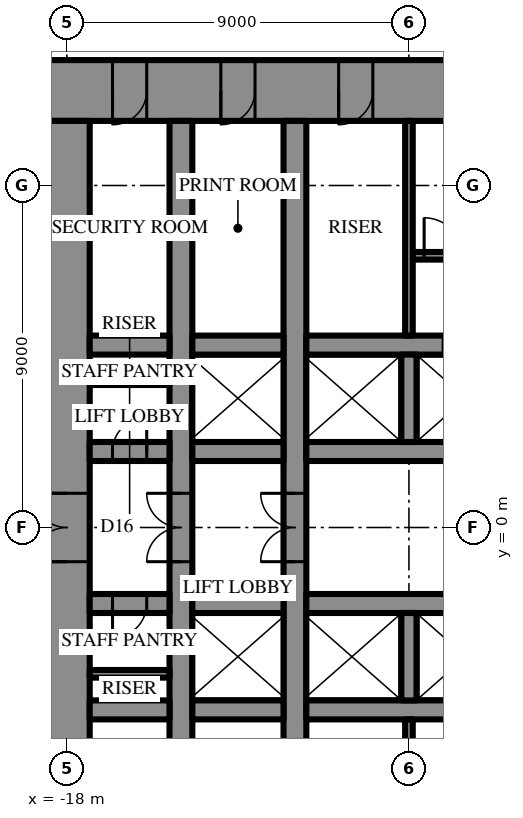
"""IFC4 building model, lengths in metres.
Left out: names, types, materials, properties, quantities, classifications, styles, units other than length and angle.
Written with IfcOpenShell. Run it as: python <this file> out.ifc"""

import sys

from ifc_helpers import new_model, si_unit, direction, frame, frame_2d, origin, place, context, subcontext, project, spatial, rectangle, extrude, element, fill, save


model = new_model("IFC4")
c1 = context("Model", 3, precision=1e-05, world=origin(), true_north=direction((0.0, 1.0)))
c2 = subcontext(c1, "Body", "Model", "MODEL_VIEW")
j1 = project(units=[si_unit("LENGTHUNIT", "METRE"), si_unit("PLANEANGLEUNIT", "RADIAN")], contexts=[c1])
p1 = place(None, origin())
s1 = spatial("IfcSite", under=j1, at=p1, CompositionType="ELEMENT")
p2 = place(p1, origin())
s2 = spatial("IfcBuilding", under=s1, at=p2, CompositionType="ELEMENT")
p3 = place(p2, frame((0.0, 0.0, 140.5)))
s3 = spatial("IfcBuildingStorey", under=s2, at=p3, CompositionType="ELEMENT", Elevation=140.5)
p4 = place(p3, frame((-18.6, 11.5, 0.0), z_axis=(0.0, 0.0, 1.0), x_axis=(1.0, 0.0, 0.0)))
e1 = element("IfcWall", 1, at=p4, inside=s3, PredefinedType="SHEAR", context=c2, shape_type="SweptSolid", body=[
    extrude(rectangle(XDim=37.2, YDim=1.6, at=frame_2d((18.6, 0.0))), origin(), (0.0, 0.0, 1.0), 4.2),
])
p5 = place(p4, frame((19.45, 0.0, 0.0)))
e2 = element("IfcOpeningElement", 2, at=p5, cuts=e1, PredefinedType="OPENING", context=c2, shape_type="SweptSolid", body=[
    extrude(rectangle(XDim=0.9, YDim=2.2, at=frame_2d((0.45, 1.1))), frame((0.0, 0.81, 0.0), z_axis=(0.0, -1.0, 0.0), x_axis=(1.0, 0.0, 0.0)), (0.0, 0.0, 1.0), 1.62),
])
p6 = place(p4, frame((22.45, 0.0, 0.0)))
e3 = element("IfcOpeningElement", 3, at=p6, cuts=e1, PredefinedType="OPENING", context=c2, shape_type="SweptSolid", body=[
    extrude(rectangle(XDim=0.9, YDim=2.2, at=frame_2d((0.45, 1.1))), frame((0.0, 0.81, 0.0), z_axis=(0.0, -1.0, 0.0), x_axis=(1.0, 0.0, 0.0)), (0.0, 0.0, 1.0), 1.62),
])
p7 = place(p4, frame((25.5, 0.0, 0.0)))
e4 = element("IfcOpeningElement", 4, at=p7, cuts=e1, PredefinedType="OPENING", context=c2, shape_type="SweptSolid", body=[
    extrude(rectangle(XDim=1.0, YDim=2.2, at=frame_2d((0.5, 1.1))), frame((0.0, 0.81, 0.0), z_axis=(0.0, -1.0, 0.0), x_axis=(1.0, 0.0, 0.0)), (0.0, 0.0, 1.0), 1.62),
])
p8 = place(p4, frame((1.8, 0.0, 0.0)))
e5 = element("IfcOpeningElement", 5, at=p8, cuts=e1, PredefinedType="OPENING", context=c2, shape_type="SweptSolid", body=[
    extrude(rectangle(XDim=0.9, YDim=2.2, at=frame_2d((0.45, 1.1))), frame((0.0, 0.81, 0.0), z_axis=(0.0, -1.0, 0.0), x_axis=(1.0, 0.0, 0.0)), (0.0, 0.0, 1.0), 1.62),
])
p9 = place(p4, frame((4.65, 0.0, 0.0)))
e6 = element("IfcOpeningElement", 6, at=p9, cuts=e1, PredefinedType="OPENING", context=c2, shape_type="SweptSolid", body=[
    extrude(rectangle(XDim=0.9, YDim=2.2, at=frame_2d((0.45, 1.1))), frame((0.0, 0.81, 0.0), z_axis=(0.0, -1.0, 0.0), x_axis=(1.0, 0.0, 0.0)), (0.0, 0.0, 1.0), 1.62),
])
p10 = place(p4, frame((7.75, 0.0, 0.0)))
e7 = element("IfcOpeningElement", 7, at=p10, cuts=e1, PredefinedType="OPENING", context=c2, shape_type="SweptSolid", body=[
    extrude(rectangle(XDim=0.9, YDim=2.2, at=frame_2d((0.45, 1.1))), frame((0.0, 0.81, 0.0), z_axis=(0.0, -1.0, 0.0), x_axis=(1.0, 0.0, 0.0)), (0.0, 0.0, 1.0), 1.62),
])
p11 = place(p4, frame((28.55, 0.0, 0.0)))
e8 = element("IfcOpeningElement", 8, at=p11, cuts=e1, PredefinedType="OPENING", context=c2, shape_type="SweptSolid", body=[
    extrude(rectangle(XDim=0.9, YDim=2.2, at=frame_2d((0.45, 1.1))), frame((0.0, 0.81, 0.0), z_axis=(0.0, -1.0, 0.0), x_axis=(1.0, 0.0, 0.0)), (0.0, 0.0, 1.0), 1.62),
])
p12 = place(p4, frame((31.65, 0.0, 0.0)))
e9 = element("IfcOpeningElement", 9, at=p12, cuts=e1, PredefinedType="OPENING", context=c2, shape_type="SweptSolid", body=[
    extrude(rectangle(XDim=0.9, YDim=2.2, at=frame_2d((0.45, 1.1))), frame((0.0, 0.81, 0.0), z_axis=(0.0, -1.0, 0.0), x_axis=(1.0, 0.0, 0.0)), (0.0, 0.0, 1.0), 1.62),
])
p13 = place(p4, frame((34.5, 0.0, 0.0)))
e10 = element("IfcOpeningElement", 10, at=p13, cuts=e1, PredefinedType="OPENING", context=c2, shape_type="SweptSolid", body=[
    extrude(rectangle(XDim=0.9, YDim=2.2, at=frame_2d((0.45, 1.1))), frame((0.0, 0.81, 0.0), z_axis=(0.0, -1.0, 0.0), x_axis=(1.0, 0.0, 0.0)), (0.0, 0.0, 1.0), 1.62),
])
p14 = place(p3, frame((-18.0, 10.7, 0.0), z_axis=(0.0, 0.0, 1.0), x_axis=(0.0, -1.0, 0.0)))
e11 = element("IfcWall", 11, at=p14, inside=s3, PredefinedType="SHEAR", context=c2, shape_type="SweptSolid", body=[
    extrude(rectangle(XDim=21.4, YDim=1.2, at=frame_2d((10.7, 0.0))), origin(), (0.0, 0.0, 1.0), 4.2),
])
p15 = place(p14, frame((9.8, 0.0, 0.0)))
e12 = element("IfcOpeningElement", 12, at=p15, cuts=e11, PredefinedType="OPENING", context=c2, shape_type="SweptSolid", body=[
    extrude(rectangle(XDim=1.8, YDim=2.4, at=frame_2d((0.9, 1.2))), frame((0.0, 0.61, 0.0), z_axis=(0.0, -1.0, 0.0), x_axis=(1.0, 0.0, 0.0)), (0.0, 0.0, 1.0), 1.22),
])
p16 = place(p3, frame((-12.0, -10.7, 0.0), z_axis=(0.0, 0.0, 1.0), x_axis=(0.0, 1.0, 0.0)))
e13 = element("IfcWall", 13, at=p16, inside=s3, PredefinedType="SHEAR", context=c2, shape_type="SweptSolid", body=[
    extrude(rectangle(XDim=21.4, YDim=0.6, at=frame_2d((10.7, 0.0))), origin(), (0.0, 0.0, 1.0), 4.2),
])
p17 = place(p16, frame((9.8, 0.0, 0.0)))
e14 = element("IfcOpeningElement", 14, at=p17, cuts=e13, PredefinedType="OPENING", context=c2, shape_type="SweptSolid", body=[
    extrude(rectangle(XDim=1.8, YDim=2.4, at=frame_2d((0.9, 1.2))), frame((0.0, 0.31, 0.0), z_axis=(0.0, -1.0, 0.0), x_axis=(1.0, 0.0, 0.0)), (0.0, 0.0, 1.0), 0.62),
])
p18 = place(p3, frame((-15.0, -10.7, 0.0), z_axis=(0.0, 0.0, 1.0), x_axis=(0.0, 1.0, 0.0)))
e15 = element("IfcWall", 15, at=p18, inside=s3, PredefinedType="SHEAR", context=c2, shape_type="SweptSolid", body=[
    extrude(rectangle(XDim=21.4, YDim=0.6, at=frame_2d((10.7, 0.0))), origin(), (0.0, 0.0, 1.0), 4.2),
])
p19 = place(p18, frame((9.8, 0.0, 0.0)))
e16 = element("IfcOpeningElement", 16, at=p19, cuts=e15, PredefinedType="OPENING", context=c2, shape_type="SweptSolid", body=[
    extrude(rectangle(XDim=1.8, YDim=2.4, at=frame_2d((0.9, 1.2))), frame((0.0, 0.31, 0.0), z_axis=(0.0, -1.0, 0.0), x_axis=(1.0, 0.0, 0.0)), (0.0, 0.0, 1.0), 0.62),
])
p20 = place(p3, frame((-17.4, 2.0, 0.0), z_axis=(0.0, 0.0, 1.0), x_axis=(1.0, 0.0, 0.0)))
e17 = element("IfcWall", 17, at=p20, inside=s3, PredefinedType="SHEAR", context=c2, shape_type="SweptSolid", body=[
    extrude(rectangle(XDim=2.1, YDim=0.5, at=frame_2d((1.05, 0.0))), origin(), (0.0, 0.0, 1.0), 4.2),
])
p21 = place(p20, frame((0.6, 0.0, 0.0)))
e18 = element("IfcOpeningElement", 18, at=p21, cuts=e17, PredefinedType="OPENING", context=c2, shape_type="SweptSolid", body=[
    extrude(rectangle(XDim=0.9, YDim=2.2, at=frame_2d((0.45, 1.1))), frame((0.0, 0.26, 0.0), z_axis=(0.0, -1.0, 0.0), x_axis=(1.0, 0.0, 0.0)), (0.0, 0.0, 1.0), 0.52),
])
p22 = place(p3, frame((-14.7, 2.0, 0.0), z_axis=(0.0, 0.0, 1.0), x_axis=(1.0, 0.0, 0.0)))
e19 = element("IfcWall", 19, at=p22, inside=s3, PredefinedType="SHEAR", context=c2, shape_type="SweptSolid", body=[
    extrude(rectangle(XDim=2.4, YDim=0.5, at=frame_2d((1.2, 0.0))), origin(), (0.0, 0.0, 1.0), 4.2),
])
p23 = place(p3, frame((-11.7, 2.0, 0.0), z_axis=(0.0, 0.0, 1.0), x_axis=(1.0, 0.0, 0.0)))
e20 = element("IfcWall", 20, at=p23, inside=s3, PredefinedType="SHEAR", context=c2, shape_type="SweptSolid", body=[
    extrude(rectangle(XDim=5.9, YDim=0.5, at=frame_2d((2.95, 0.0))), origin(), (0.0, 0.0, 1.0), 4.2),
])
p24 = place(p3, frame((-17.4, 4.8, 0.0), z_axis=(0.0, 0.0, 1.0), x_axis=(1.0, 0.0, 0.0)))
e21 = element("IfcWall", 21, at=p24, inside=s3, PredefinedType="SHEAR", context=c2, shape_type="SweptSolid", body=[
    extrude(rectangle(XDim=2.1, YDim=0.5, at=frame_2d((1.05, 0.0))), origin(), (0.0, 0.0, 1.0), 4.2),
])
p25 = place(p3, frame((-14.7, 4.8, 0.0), z_axis=(0.0, 0.0, 1.0), x_axis=(1.0, 0.0, 0.0)))
e22 = element("IfcWall", 22, at=p25, inside=s3, PredefinedType="SHEAR", context=c2, shape_type="SweptSolid", body=[
    extrude(rectangle(XDim=2.4, YDim=0.5, at=frame_2d((1.2, 0.0))), origin(), (0.0, 0.0, 1.0), 4.2),
])
p26 = place(p3, frame((-11.7, 4.8, 0.0), z_axis=(0.0, 0.0, 1.0), x_axis=(1.0, 0.0, 0.0)))
e23 = element("IfcWall", 23, at=p26, inside=s3, PredefinedType="SHEAR", context=c2, shape_type="SweptSolid", body=[
    extrude(rectangle(XDim=23.4, YDim=0.5, at=frame_2d((11.7, 0.0))), origin(), (0.0, 0.0, 1.0), 4.2),
])
p27 = place(p26, frame((6.6, 0.0, 0.0)))
e24 = element("IfcOpeningElement", 24, at=p27, cuts=e23, PredefinedType="OPENING", context=c2, shape_type="SweptSolid", body=[
    extrude(rectangle(XDim=1.2, YDim=2.2, at=frame_2d((0.6, 1.1))), frame((0.0, 0.26, 0.0), z_axis=(0.0, -1.0, 0.0), x_axis=(1.0, 0.0, 0.0)), (0.0, 0.0, 1.0), 0.52),
])
p28 = place(p26, frame((3.6, 0.0, 0.0)))
e25 = element("IfcOpeningElement", 25, at=p28, cuts=e23, PredefinedType="OPENING", context=c2, shape_type="SweptSolid", body=[
    extrude(rectangle(XDim=1.2, YDim=2.2, at=frame_2d((0.6, 1.1))), frame((0.0, 0.26, 0.0), z_axis=(0.0, -1.0, 0.0), x_axis=(1.0, 0.0, 0.0)), (0.0, 0.0, 1.0), 0.52),
])
p29 = place(p3, frame((-9.0, 2.25, 0.0), z_axis=(0.0, 0.0, 1.0), x_axis=(0.0, 1.0, 0.0)))
e26 = element("IfcWall", 26, at=p29, inside=s3, PredefinedType="SHEAR", context=c2, shape_type="SweptSolid", body=[
    extrude(rectangle(XDim=2.3, YDim=0.4, at=frame_2d((1.15, 0.0))), origin(), (0.0, 0.0, 1.0), 4.2),
])
p30 = place(p3, frame((-8.9, 7.15, 0.0), z_axis=(0.0, 0.0, 1.0), x_axis=(1.0, 0.0, 0.0)))
e27 = element("IfcWall", 27, at=p30, inside=s3, PredefinedType="SHEAR", context=c2, shape_type="SweptSolid", body=[
    extrude(rectangle(XDim=8.6, YDim=0.2, at=frame_2d((4.3, 0.0))), origin(), (0.0, 0.0, 1.0), 4.2),
])
p31 = place(p30, frame((0.3, 0.0, 0.0)))
e28 = element("IfcOpeningElement", 28, at=p31, cuts=e27, PredefinedType="OPENING", context=c2, shape_type="SweptSolid", body=[
    extrude(rectangle(XDim=1.0, YDim=2.2, at=frame_2d((0.5, 1.1))), frame((0.0, 0.11, 0.0), z_axis=(0.0, -1.0, 0.0), x_axis=(1.0, 0.0, 0.0)), (0.0, 0.0, 1.0), 0.22),
])
p32 = place(p3, frame((3.2, -2.0, 0.0), z_axis=(0.0, 0.0, 1.0), x_axis=(-1.0, 0.0, 0.0)))
e29 = element("IfcWall", 29, at=p32, inside=s3, PredefinedType="SHEAR", context=c2, shape_type="SweptSolid", body=[
    extrude(rectangle(XDim=14.9, YDim=0.5, at=frame_2d((7.45, 0.0))), origin(), (0.0, 0.0, 1.0), 4.2),
])
p33 = place(p32, frame((1.15, 0.0, 0.0)))
e30 = element("IfcOpeningElement", 30, at=p33, cuts=e29, PredefinedType="OPENING", context=c2, shape_type="SweptSolid", body=[
    extrude(rectangle(XDim=1.1, YDim=2.2, at=frame_2d((0.55, 1.1))), frame((0.0, 0.26, 0.0), z_axis=(0.0, -1.0, 0.0), x_axis=(1.0, 0.0, 0.0)), (0.0, 0.0, 1.0), 0.52),
])
p34 = place(p32, frame((4.15, 0.0, 0.0)))
e31 = element("IfcOpeningElement", 31, at=p34, cuts=e29, PredefinedType="OPENING", context=c2, shape_type="SweptSolid", body=[
    extrude(rectangle(XDim=1.1, YDim=2.2, at=frame_2d((0.55, 1.1))), frame((0.0, 0.26, 0.0), z_axis=(0.0, -1.0, 0.0), x_axis=(1.0, 0.0, 0.0)), (0.0, 0.0, 1.0), 0.52),
])
p35 = place(p32, frame((7.15, 0.0, 0.0)))
e32 = element("IfcOpeningElement", 32, at=p35, cuts=e29, PredefinedType="OPENING", context=c2, shape_type="SweptSolid", body=[
    extrude(rectangle(XDim=1.1, YDim=2.2, at=frame_2d((0.55, 1.1))), frame((0.0, 0.26, 0.0), z_axis=(0.0, -1.0, 0.0), x_axis=(1.0, 0.0, 0.0)), (0.0, 0.0, 1.0), 0.52),
])
p36 = place(p32, frame((10.15, 0.0, 0.0)))
e33 = element("IfcOpeningElement", 33, at=p36, cuts=e29, PredefinedType="OPENING", context=c2, shape_type="SweptSolid", body=[
    extrude(rectangle(XDim=1.1, YDim=2.2, at=frame_2d((0.55, 1.1))), frame((0.0, 0.26, 0.0), z_axis=(0.0, -1.0, 0.0), x_axis=(1.0, 0.0, 0.0)), (0.0, 0.0, 1.0), 0.52),
])
p37 = place(p3, frame((-12.3, -2.0, 0.0), z_axis=(0.0, 0.0, 1.0), x_axis=(-1.0, 0.0, 0.0)))
e34 = element("IfcWall", 34, at=p37, inside=s3, PredefinedType="SHEAR", context=c2, shape_type="SweptSolid", body=[
    extrude(rectangle(XDim=2.4, YDim=0.5, at=frame_2d((1.2, 0.0))), origin(), (0.0, 0.0, 1.0), 4.2),
])
p38 = place(p3, frame((-15.3, -2.0, 0.0), z_axis=(0.0, 0.0, 1.0), x_axis=(-1.0, 0.0, 0.0)))
e35 = element("IfcWall", 35, at=p38, inside=s3, PredefinedType="SHEAR", context=c2, shape_type="SweptSolid", body=[
    extrude(rectangle(XDim=2.1, YDim=0.5, at=frame_2d((1.05, 0.0))), origin(), (0.0, 0.0, 1.0), 4.2),
])
p39 = place(p38, frame((0.6, 0.0, 0.0)))
e36 = element("IfcOpeningElement", 36, at=p39, cuts=e35, PredefinedType="OPENING", context=c2, shape_type="SweptSolid", body=[
    extrude(rectangle(XDim=0.9, YDim=2.2, at=frame_2d((0.45, 1.1))), frame((0.0, 0.26, 0.0), z_axis=(0.0, -1.0, 0.0), x_axis=(1.0, 0.0, 0.0)), (0.0, 0.0, 1.0), 0.52),
])
p40 = place(p3, frame((11.7, -4.8, 0.0), z_axis=(0.0, 0.0, 1.0), x_axis=(-1.0, 0.0, 0.0)))
e37 = element("IfcWall", 37, at=p40, inside=s3, PredefinedType="SHEAR", context=c2, shape_type="SweptSolid", body=[
    extrude(rectangle(XDim=23.4, YDim=0.5, at=frame_2d((11.7, 0.0))), origin(), (0.0, 0.0, 1.0), 4.2),
])
p41 = place(p40, frame((6.6, 0.0, 0.0)))
e38 = element("IfcOpeningElement", 38, at=p41, cuts=e37, PredefinedType="OPENING", context=c2, shape_type="SweptSolid", body=[
    extrude(rectangle(XDim=1.2, YDim=2.2, at=frame_2d((0.6, 1.1))), frame((0.0, 0.26, 0.0), z_axis=(0.0, -1.0, 0.0), x_axis=(1.0, 0.0, 0.0)), (0.0, 0.0, 1.0), 0.52),
])
p42 = place(p40, frame((3.6, 0.0, 0.0)))
e39 = element("IfcOpeningElement", 39, at=p42, cuts=e37, PredefinedType="OPENING", context=c2, shape_type="SweptSolid", body=[
    extrude(rectangle(XDim=1.2, YDim=2.2, at=frame_2d((0.6, 1.1))), frame((0.0, 0.26, 0.0), z_axis=(0.0, -1.0, 0.0), x_axis=(1.0, 0.0, 0.0)), (0.0, 0.0, 1.0), 0.52),
])
p43 = place(p3, frame((-12.3, -4.8, 0.0), z_axis=(0.0, 0.0, 1.0), x_axis=(-1.0, 0.0, 0.0)))
e40 = element("IfcWall", 40, at=p43, inside=s3, PredefinedType="SHEAR", context=c2, shape_type="SweptSolid", body=[
    extrude(rectangle(XDim=2.4, YDim=0.5, at=frame_2d((1.2, 0.0))), origin(), (0.0, 0.0, 1.0), 4.2),
])
p44 = place(p3, frame((-15.3, -4.8, 0.0), z_axis=(0.0, 0.0, 1.0), x_axis=(-1.0, 0.0, 0.0)))
e41 = element("IfcWall", 41, at=p44, inside=s3, PredefinedType="SHEAR", context=c2, shape_type="SweptSolid", body=[
    extrude(rectangle(XDim=2.1, YDim=0.5, at=frame_2d((1.05, 0.0))), origin(), (0.0, 0.0, 1.0), 4.2),
])
p45 = place(p3, frame((-9.0, -2.25, 0.0), z_axis=(0.0, 0.0, 1.0), x_axis=(0.0, -1.0, 0.0)))
e42 = element("IfcWall", 42, at=p45, inside=s3, PredefinedType="SHEAR", context=c2, shape_type="SweptSolid", body=[
    extrude(rectangle(XDim=2.3, YDim=0.4, at=frame_2d((1.15, 0.0))), origin(), (0.0, 0.0, 1.0), 4.2),
])
for number, where, z_axis, x_axis in (
    (43, (-9.0, 5.05, 0.0), (0.0, 0.0, 1.0), (0.0, 1.0, 0.0)),
    (44, (-9.0, -5.05, 0.0), (0.0, 0.0, 1.0), (0.0, -1.0, 0.0)),
):
    element("IfcWall", number, at=place(p3, frame(where, z_axis=z_axis, x_axis=x_axis)), inside=s3, PredefinedType="PARTITIONING", context=c2, shape_type="SweptSolid", body=[
        extrude(rectangle(XDim=5.65, YDim=0.2, at=frame_2d((2.825, 0.0))), origin(), (0.0, 0.0, 1.0), 4.0),
    ])
for number, where, z_axis, x_axis in (
    (45, (-17.4, 3.85, 0.0), (0.0, 0.0, 1.0), (1.0, 0.0, 0.0)),
    (46, (-15.3, -3.85, 0.0), (0.0, 0.0, 1.0), (-1.0, 0.0, 0.0)),
):
    element("IfcWall", number, at=place(p3, frame(where, z_axis=z_axis, x_axis=x_axis)), inside=s3, PredefinedType="PARTITIONING", context=c2, shape_type="SweptSolid", body=[
        extrude(rectangle(XDim=2.1, YDim=0.2, at=frame_2d((1.05, 0.0))), origin(), (0.0, 0.0, 1.0), 4.0),
    ])
p46 = place(p15, frame((1.8, 0.0, 0.0), z_axis=(0.0, 0.0, 1.0), x_axis=(-1.0, 0.0, 0.0)))
e47 = element("IfcDoor", 47, at=p46, inside=s3, OperationType="DOUBLE_DOOR_SINGLE_SWING", PredefinedType="DOOR", context=c2, shape_type="SweptSolid", body=[
    extrude(rectangle(XDim=1.8, YDim=2.4, at=frame_2d((0.9, 1.2))), frame((0.0, 0.025, 0.0), z_axis=(0.0, -1.0, 0.0), x_axis=(1.0, 0.0, 0.0)), (0.0, 0.0, 1.0), 0.05),
])
fill(e12, e47)
p47 = place(p31, origin())
e48 = element("IfcDoor", 48, at=p47, inside=s3, OperationType="SINGLE_SWING_RIGHT", PredefinedType="DOOR", context=c2, shape_type="SweptSolid", body=[
    extrude(rectangle(XDim=1.0, YDim=2.2, at=frame_2d((0.5, 1.1))), frame((0.0, 0.025, 0.0), z_axis=(0.0, -1.0, 0.0), x_axis=(1.0, 0.0, 0.0)), (0.0, 0.0, 1.0), 0.05),
])
fill(e28, e48)
p48 = place(p8, frame((0.9, 0.0, 0.0), z_axis=(0.0, 0.0, 1.0), x_axis=(-1.0, 0.0, 0.0)))
e49 = element("IfcDoor", 49, at=p48, inside=s3, OperationType="SINGLE_SWING_LEFT", PredefinedType="DOOR", context=c2, shape_type="SweptSolid", body=[
    extrude(rectangle(XDim=0.9, YDim=2.2, at=frame_2d((0.45, 1.1))), frame((0.0, 0.025, 0.0), z_axis=(0.0, -1.0, 0.0), x_axis=(1.0, 0.0, 0.0)), (0.0, 0.0, 1.0), 0.05),
])
fill(e5, e49)
p49 = place(p9, frame((0.9, 0.0, 0.0), z_axis=(0.0, 0.0, 1.0), x_axis=(-1.0, 0.0, 0.0)))
e50 = element("IfcDoor", 50, at=p49, inside=s3, OperationType="SINGLE_SWING_LEFT", PredefinedType="DOOR", context=c2, shape_type="SweptSolid", body=[
    extrude(rectangle(XDim=0.9, YDim=2.2, at=frame_2d((0.45, 1.1))), frame((0.0, 0.025, 0.0), z_axis=(0.0, -1.0, 0.0), x_axis=(1.0, 0.0, 0.0)), (0.0, 0.0, 1.0), 0.05),
])
fill(e6, e50)
p50 = place(p10, frame((0.9, 0.0, 0.0), z_axis=(0.0, 0.0, 1.0), x_axis=(-1.0, 0.0, 0.0)))
e51 = element("IfcDoor", 51, at=p50, inside=s3, OperationType="SINGLE_SWING_LEFT", PredefinedType="DOOR", context=c2, shape_type="SweptSolid", body=[
    extrude(rectangle(XDim=0.9, YDim=2.2, at=frame_2d((0.45, 1.1))), frame((0.0, 0.025, 0.0), z_axis=(0.0, -1.0, 0.0), x_axis=(1.0, 0.0, 0.0)), (0.0, 0.0, 1.0), 0.05),
])
fill(e7, e51)
p51 = place(p21, origin())
e52 = element("IfcDoor", 52, at=p51, inside=s3, OperationType="SINGLE_SWING_LEFT", PredefinedType="DOOR", context=c2, shape_type="SweptSolid", body=[
    extrude(rectangle(XDim=0.9, YDim=2.2, at=frame_2d((0.45, 1.1))), frame((0.0, 0.025, 0.0), z_axis=(0.0, -1.0, 0.0), x_axis=(1.0, 0.0, 0.0)), (0.0, 0.0, 1.0), 0.05),
])
fill(e18, e52)
p52 = place(p39, origin())
e53 = element("IfcDoor", 53, at=p52, inside=s3, OperationType="SINGLE_SWING_LEFT", PredefinedType="DOOR", context=c2, shape_type="SweptSolid", body=[
    extrude(rectangle(XDim=0.9, YDim=2.2, at=frame_2d((0.45, 1.1))), frame((0.0, 0.025, 0.0), z_axis=(0.0, -1.0, 0.0), x_axis=(1.0, 0.0, 0.0)), (0.0, 0.0, 1.0), 0.05),
])
fill(e36, e53)
p53 = place(p17, origin())
e54 = element("IfcDoor", 54, at=p53, inside=s3, OperationType="DOUBLE_DOOR_SINGLE_SWING", PredefinedType="DOOR", context=c2, shape_type="SweptSolid", body=[
    extrude(rectangle(XDim=1.8, YDim=2.4, at=frame_2d((0.9, 1.2))), frame((0.0, 0.025, 0.0), z_axis=(0.0, -1.0, 0.0), x_axis=(1.0, 0.0, 0.0)), (0.0, 0.0, 1.0), 0.05),
])
fill(e14, e54)
p54 = place(p19, origin())
e55 = element("IfcDoor", 55, at=p54, inside=s3, OperationType="DOUBLE_DOOR_SINGLE_SWING", PredefinedType="DOOR", context=c2, shape_type="SweptSolid", body=[
    extrude(rectangle(XDim=1.8, YDim=2.4, at=frame_2d((0.9, 1.2))), frame((0.0, 0.025, 0.0), z_axis=(0.0, -1.0, 0.0), x_axis=(1.0, 0.0, 0.0)), (0.0, 0.0, 1.0), 0.05),
])
fill(e16, e55)
save(model, sys.argv[1])
